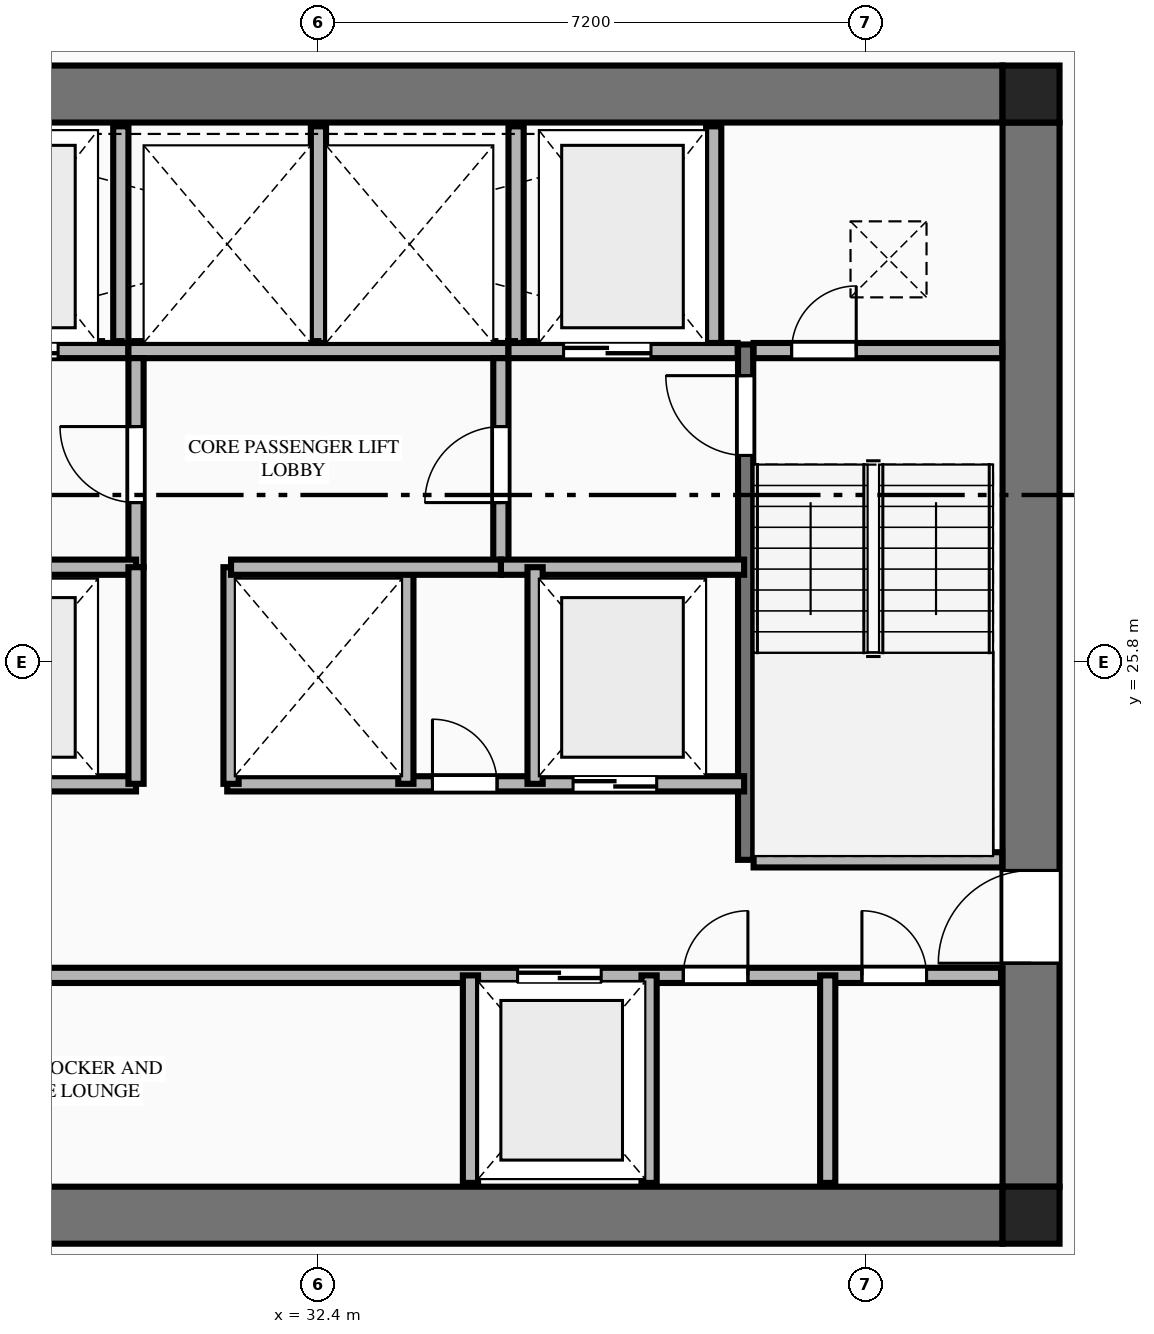
"""IFC4 building model, lengths in metres.
Left out: names, types, materials, properties, quantities, classifications, styles, units other than length and angle.
Written with IfcOpenShell. Run it as: python <this file> out.ifc"""

import sys

from ifc_helpers import new_model, si_unit, direction, frame, frame_2d, origin, origin_2d, place, context, subcontext, project, spatial, rectangle, extrude, element, fill, save


model = new_model("IFC4")
c1 = context("Model", 3, precision=1e-05, world=origin(), true_north=direction((0.0, 1.0)))
c2 = subcontext(c1, "Body", "Model", "MODEL_VIEW")
j1 = project(units=[si_unit("LENGTHUNIT", "METRE"), si_unit("PLANEANGLEUNIT", "RADIAN")], contexts=[c1])
p1 = place(None, origin())
s1 = spatial("IfcSite", under=j1, at=p1, CompositionType="ELEMENT")
p2 = place(p1, origin())
s2 = spatial("IfcBuilding", under=s1, at=p2, CompositionType="ELEMENT")
p3 = place(p2, frame((0.0, 0.0, 112.6)))
s3 = spatial("IfcBuildingStorey", under=s2, at=p3, CompositionType="ELEMENT", Elevation=112.6)
for number, where, z_axis, x_axis in (
    (1, (41.775, 18.525, 0.0), (0.0, 0.0, 1.0), (1.0, 0.0, 0.0)),
    (2, (41.775, 33.275, 0.0), (0.0, 0.0, 1.0), (1.0, 0.0, 0.0)),
):
    element("IfcColumn", number, at=place(p3, frame(where, z_axis=z_axis, x_axis=x_axis)), inside=s3, PredefinedType="COLUMN", context=c2, shape_type="SweptSolid", body=[
        extrude(rectangle(XDim=0.75, YDim=0.75, at=origin_2d()), origin(), (0.0, 0.0, 1.0), 3.55),
    ])
for number, where, z_axis, x_axis in (
    (3, (23.4, 18.525, 0.0), (0.0, 0.0, 1.0), (1.0, 0.0, 0.0)),
    (4, (23.4, 33.275, 0.0), (0.0, 0.0, 1.0), (1.0, 0.0, 0.0)),
):
    element("IfcWall", number, at=place(p3, frame(where, z_axis=z_axis, x_axis=x_axis)), inside=s3, PredefinedType="SHEAR", context=c2, shape_type="SweptSolid", body=[
        extrude(rectangle(XDim=18.0, YDim=0.75, at=frame_2d((9.0, 0.0))), origin(), (0.0, 0.0, 1.0), 3.34),
    ])
p4 = place(p3, frame((41.775, 18.9, 0.0), z_axis=(0.0, 0.0, 1.0), x_axis=(0.0, 1.0, 0.0)))
e5 = element("IfcWall", 5, at=p4, inside=s3, PredefinedType="SHEAR", context=c2, shape_type="SweptSolid", body=[
    extrude(rectangle(XDim=14.0, YDim=0.75, at=frame_2d((7.0, 0.0))), origin(), (0.0, 0.0, 1.0), 3.34),
])
p5 = place(p4, frame((2.94, 0.0, 0.0)))
e6 = element("IfcOpeningElement", 6, at=p5, cuts=e5, PredefinedType="OPENING", context=c2, shape_type="SweptSolid", body=[
    extrude(rectangle(XDim=1.22, YDim=2.25, at=frame_2d((0.61, 1.125))), frame((0.0, 0.385, 0.0), z_axis=(0.0, -1.0, 0.0), x_axis=(1.0, 0.0, 0.0)), (0.0, 0.0, 1.0), 0.77),
])
p6 = place(p3, frame((38.02, 23.2, 0.0), z_axis=(0.0, 0.0, 1.0), x_axis=(0.0, 1.0, 0.0)))
e7 = element("IfcWall", 7, at=p6, inside=s3, PredefinedType="SHEAR", context=c2, shape_type="SweptSolid", body=[
    extrude(rectangle(XDim=6.78, YDim=0.2, at=frame_2d((3.39, 0.0))), origin(), (0.0, 0.0, 1.0), 3.55),
])
p7 = place(p6, frame((5.32, 0.0, 0.0)))
e8 = element("IfcOpeningElement", 8, at=p7, cuts=e7, PredefinedType="OPENING", context=c2, shape_type="SweptSolid", body=[
    extrude(rectangle(XDim=1.05, YDim=2.15, at=frame_2d((0.525, 1.075))), frame((0.0, 0.11, 0.0), z_axis=(0.0, -1.0, 0.0), x_axis=(1.0, 0.0, 0.0)), (0.0, 0.0, 1.0), 0.22),
])
p8 = place(p3, frame((38.125, 23.2, 0.0), z_axis=(0.0, 0.0, 1.0), x_axis=(1.0, 0.0, 0.0)))
e9 = element("IfcWall", 9, at=p8, inside=s3, PredefinedType="PLUMBINGWALL", context=c2, shape_type="SweptSolid", body=[
    extrude(rectangle(XDim=3.27, YDim=0.2, at=frame_2d((1.635, 0.0))), origin(), (0.0, 0.0, 1.0), 3.34),
])
p9 = place(p3, frame((26.885, 29.9, 0.0), z_axis=(0.0, 0.0, 1.0), x_axis=(1.0, 0.0, 0.0)))
e10 = element("IfcWall", 10, at=p9, inside=s3, PredefinedType="PLUMBINGWALL", context=c2, shape_type="SweptSolid", body=[
    extrude(rectangle(XDim=3.015, YDim=0.2, at=frame_2d((1.507, 0.0))), origin(), (0.0, 0.0, 1.0), 3.34),
])
p10 = place(p9, frame((0.94, 0.0, 0.0)))
e11 = element("IfcOpeningElement", 11, at=p10, cuts=e10, PredefinedType="OPENING", context=c2, shape_type="SweptSolid", body=[
    extrude(rectangle(XDim=1.15, YDim=2.2, at=frame_2d((0.575, 1.1))), frame((0.0, 0.11, 0.0), z_axis=(0.0, -1.0, 0.0), x_axis=(1.0, 0.0, 0.0)), (0.0, 0.0, 1.0), 0.22),
])
p11 = place(p3, frame((29.9, 29.9, 0.0), z_axis=(0.0, 0.0, 1.0), x_axis=(1.0, 0.0, 0.0)))
e12 = element("IfcWall", 12, at=p11, inside=s3, PredefinedType="PLUMBINGWALL", context=c2, shape_type="SweptSolid", body=[
    extrude(rectangle(XDim=5.0, YDim=0.2, at=frame_2d((2.5, 0.0))), origin(), (0.0, 0.0, 1.0), 3.34),
])
p12 = place(p3, frame((34.9, 29.9, 0.0), z_axis=(0.0, 0.0, 1.0), x_axis=(1.0, 0.0, 0.0)))
e13 = element("IfcWall", 13, at=p12, inside=s3, PredefinedType="PLUMBINGWALL", context=c2, shape_type="SweptSolid", body=[
    extrude(rectangle(XDim=3.015, YDim=0.2, at=frame_2d((1.508, 0.0))), origin(), (0.0, 0.0, 1.0), 3.34),
])
p13 = place(p12, frame((0.725, 0.0, 0.0)))
e14 = element("IfcOpeningElement", 14, at=p13, cuts=e13, PredefinedType="OPENING", context=c2, shape_type="SweptSolid", body=[
    extrude(rectangle(XDim=1.15, YDim=2.2, at=frame_2d((0.575, 1.1))), frame((0.0, 0.11, 0.0), z_axis=(0.0, -1.0, 0.0), x_axis=(1.0, 0.0, 0.0)), (0.0, 0.0, 1.0), 0.22),
])
p14 = place(p3, frame((38.125, 29.9, 0.0), z_axis=(0.0, 0.0, 1.0), x_axis=(1.0, 0.0, 0.0)))
e15 = element("IfcWall", 15, at=p14, inside=s3, PredefinedType="PLUMBINGWALL", context=c2, shape_type="SweptSolid", body=[
    extrude(rectangle(XDim=3.27, YDim=0.2, at=frame_2d((1.635, 0.0))), origin(), (0.0, 0.0, 1.0), 3.34),
])
p15 = place(p14, frame((0.5, 0.0, 0.0)))
e16 = element("IfcOpeningElement", 16, at=p15, cuts=e15, PredefinedType="OPENING", context=c2, shape_type="SweptSolid", body=[
    extrude(rectangle(XDim=0.85, YDim=2.05, at=frame_2d((0.425, 1.025))), frame((0.0, 0.11, 0.0), z_axis=(0.0, -1.0, 0.0), x_axis=(1.0, 0.0, 0.0)), (0.0, 0.0, 1.0), 0.22),
])
for number, where, z_axis, x_axis in (
    (17, (29.8, 30.0, 0.0), (0.0, 0.0, 1.0), (0.0, 1.0, 0.0)),
    (18, (32.4, 30.0, 0.0), (0.0, 0.0, 1.0), (0.0, 1.0, 0.0)),
    (19, (35.0, 30.0, 0.0), (0.0, 0.0, 1.0), (0.0, 1.0, 0.0)),
    (20, (37.6, 30.0, 0.0), (0.0, 0.0, 1.0), (0.0, 1.0, 0.0)),
):
    element("IfcWall", number, at=place(p3, frame(where, z_axis=z_axis, x_axis=x_axis)), inside=s3, PredefinedType="PLUMBINGWALL", context=c2, shape_type="SweptSolid", body=[
        extrude(rectangle(XDim=2.85, YDim=0.2, at=frame_2d((1.425, 0.0))), origin(), (0.0, 0.0, 1.0), 3.34),
    ])
p16 = place(p3, frame((30.0, 27.05, 0.0), z_axis=(0.0, 0.0, 1.0), x_axis=(0.0, 1.0, 0.0)))
e21 = element("IfcWall", 21, at=p16, inside=s3, PredefinedType="PLUMBINGWALL", context=c2, shape_type="SweptSolid", body=[
    extrude(rectangle(XDim=2.75, YDim=0.2, at=frame_2d((1.375, 0.0))), origin(), (0.0, 0.0, 1.0), 3.34),
])
p17 = place(p16, frame((0.85, 0.0, 0.0)))
e22 = element("IfcOpeningElement", 22, at=p17, cuts=e21, PredefinedType="OPENING", context=c2, shape_type="SweptSolid", body=[
    extrude(rectangle(XDim=1.0, YDim=2.15, at=frame_2d((0.5, 1.075))), frame((0.0, 0.11, 0.0), z_axis=(0.0, -1.0, 0.0), x_axis=(1.0, 0.0, 0.0)), (0.0, 0.0, 1.0), 0.22),
])
p18 = place(p3, frame((26.8, 27.05, 0.0), z_axis=(0.0, 0.0, 1.0), x_axis=(1.0, 0.0, 0.0)))
e23 = element("IfcWall", 23, at=p18, inside=s3, PredefinedType="PLUMBINGWALL", context=c2, shape_type="SweptSolid", body=[
    extrude(rectangle(XDim=3.2, YDim=0.2, at=frame_2d((1.6, 0.0))), origin(), (0.0, 0.0, 1.0), 3.34),
])
p19 = place(p3, frame((34.8, 27.05, 0.0), z_axis=(0.0, 0.0, 1.0), x_axis=(0.0, 1.0, 0.0)))
e24 = element("IfcWall", 24, at=p19, inside=s3, PredefinedType="PLUMBINGWALL", context=c2, shape_type="SweptSolid", body=[
    extrude(rectangle(XDim=2.75, YDim=0.2, at=frame_2d((1.375, 0.0))), origin(), (0.0, 0.0, 1.0), 3.34),
])
p20 = place(p19, frame((0.85, 0.0, 0.0)))
e25 = element("IfcOpeningElement", 25, at=p20, cuts=e24, PredefinedType="OPENING", context=c2, shape_type="SweptSolid", body=[
    extrude(rectangle(XDim=1.0, YDim=2.15, at=frame_2d((0.5, 1.075))), frame((0.0, 0.11, 0.0), z_axis=(0.0, -1.0, 0.0), x_axis=(1.0, 0.0, 0.0)), (0.0, 0.0, 1.0), 0.22),
])
p21 = place(p3, frame((34.8, 27.05, 0.0), z_axis=(0.0, 0.0, 1.0), x_axis=(1.0, 0.0, 0.0)))
e26 = element("IfcWall", 26, at=p21, inside=s3, PredefinedType="PLUMBINGWALL", context=c2, shape_type="SweptSolid", body=[
    extrude(rectangle(XDim=3.2, YDim=0.2, at=frame_2d((1.6, 0.0))), origin(), (0.0, 0.0, 1.0), 3.34),
])
p22 = place(p3, frame((26.8, 24.2, 0.0), z_axis=(0.0, 0.0, 1.0), x_axis=(1.0, 0.0, 0.0)))
e27 = element("IfcWall", 27, at=p22, inside=s3, PredefinedType="PLUMBINGWALL", context=c2, shape_type="SweptSolid", body=[
    extrude(rectangle(XDim=3.2, YDim=0.2, at=frame_2d((1.6, 0.0))), origin(), (0.0, 0.0, 1.0), 3.34),
])
p23 = place(p22, frame((0.85, 0.0, 0.0)))
e28 = element("IfcOpeningElement", 28, at=p23, cuts=e27, PredefinedType="OPENING", context=c2, shape_type="SweptSolid", body=[
    extrude(rectangle(XDim=1.1, YDim=2.2, at=frame_2d((0.55, 1.1))), frame((0.0, 0.11, 0.0), z_axis=(0.0, -1.0, 0.0), x_axis=(1.0, 0.0, 0.0)), (0.0, 0.0, 1.0), 0.22),
])
p24 = place(p3, frame((30.0, 24.2, 0.0), z_axis=(0.0, 0.0, 1.0), x_axis=(0.0, 1.0, 0.0)))
e29 = element("IfcWall", 29, at=p24, inside=s3, PredefinedType="PLUMBINGWALL", context=c2, shape_type="SweptSolid", body=[
    extrude(rectangle(XDim=2.85, YDim=0.2, at=frame_2d((1.425, 0.0))), origin(), (0.0, 0.0, 1.0), 3.34),
])
p25 = place(p3, frame((31.2, 24.2, 0.0), z_axis=(0.0, 0.0, 1.0), x_axis=(1.0, 0.0, 0.0)))
e30 = element("IfcWall", 30, at=p25, inside=s3, PredefinedType="PLUMBINGWALL", context=c2, shape_type="SweptSolid", body=[
    extrude(rectangle(XDim=6.8, YDim=0.2, at=frame_2d((3.4, 0.0))), origin(), (0.0, 0.0, 1.0), 3.34),
])
p26 = place(p25, frame((2.7, 0.0, 0.0)))
e31 = element("IfcOpeningElement", 31, at=p26, cuts=e30, PredefinedType="OPENING", context=c2, shape_type="SweptSolid", body=[
    extrude(rectangle(XDim=0.85, YDim=2.05, at=frame_2d((0.425, 1.025))), frame((0.0, 0.11, 0.0), z_axis=(0.0, -1.0, 0.0), x_axis=(1.0, 0.0, 0.0)), (0.0, 0.0, 1.0), 0.22),
])
p27 = place(p25, frame((4.55, 0.0, 0.0)))
e32 = element("IfcOpeningElement", 32, at=p27, cuts=e30, PredefinedType="OPENING", context=c2, shape_type="SweptSolid", body=[
    extrude(rectangle(XDim=1.1, YDim=2.2, at=frame_2d((0.55, 1.1))), frame((0.0, 0.11, 0.0), z_axis=(0.0, -1.0, 0.0), x_axis=(1.0, 0.0, 0.0)), (0.0, 0.0, 1.0), 0.22),
])
for number, where, z_axis, x_axis in (
    (33, (31.25, 24.2, 0.0), (0.0, 0.0, 1.0), (0.0, 1.0, 0.0)),
    (34, (33.55, 24.2, 0.0), (0.0, 0.0, 1.0), (0.0, 1.0, 0.0)),
    (35, (35.25, 24.2, 0.0), (0.0, 0.0, 1.0), (0.0, 1.0, 0.0)),
):
    element("IfcWall", number, at=place(p3, frame(where, z_axis=z_axis, x_axis=x_axis)), inside=s3, PredefinedType="PLUMBINGWALL", context=c2, shape_type="SweptSolid", body=[
        extrude(rectangle(XDim=2.85, YDim=0.2, at=frame_2d((1.425, 0.0))), origin(), (0.0, 0.0, 1.0), 3.34),
    ])
p28 = place(p3, frame((31.25, 27.05, 0.0), z_axis=(0.0, 0.0, 1.0), x_axis=(1.0, 0.0, 0.0)))
e36 = element("IfcWall", 36, at=p28, inside=s3, PredefinedType="PLUMBINGWALL", context=c2, shape_type="SweptSolid", body=[
    extrude(rectangle(XDim=3.55, YDim=0.2, at=frame_2d((1.775, 0.0))), origin(), (0.0, 0.0, 1.0), 3.34),
])
p29 = place(p3, frame((23.42, 21.68, 0.0), z_axis=(0.0, 0.0, 1.0), x_axis=(1.0, 0.0, 0.0)))
e37 = element("IfcWall", 37, at=p29, inside=s3, PredefinedType="PLUMBINGWALL", context=c2, shape_type="SweptSolid", body=[
    extrude(rectangle(XDim=17.96, YDim=0.2, at=frame_2d((8.98, 0.0))), origin(), (0.0, 0.0, 1.0), 3.34),
])
p30 = place(p29, frame((11.6, 0.0, 0.0)))
e38 = element("IfcOpeningElement", 38, at=p30, cuts=e37, PredefinedType="OPENING", context=c2, shape_type="SweptSolid", body=[
    extrude(rectangle(XDim=1.1, YDim=2.2, at=frame_2d((0.55, 1.1))), frame((0.0, 0.11, 0.0), z_axis=(0.0, -1.0, 0.0), x_axis=(1.0, 0.0, 0.0)), (0.0, 0.0, 1.0), 0.22),
])
p31 = place(p29, frame((0.41, 0.0, 0.0)))
e39 = element("IfcOpeningElement", 39, at=p31, cuts=e37, PredefinedType="OPENING", context=c2, shape_type="SweptSolid", body=[
    extrude(rectangle(XDim=0.85, YDim=2.05, at=frame_2d((0.425, 1.025))), frame((0.0, 0.11, 0.0), z_axis=(0.0, -1.0, 0.0), x_axis=(1.0, 0.0, 0.0)), (0.0, 0.0, 1.0), 0.22),
])
p32 = place(p29, frame((13.78, 0.0, 0.0)))
e40 = element("IfcOpeningElement", 40, at=p32, cuts=e37, PredefinedType="OPENING", context=c2, shape_type="SweptSolid", body=[
    extrude(rectangle(XDim=0.85, YDim=2.05, at=frame_2d((0.425, 1.025))), frame((0.0, 0.11, 0.0), z_axis=(0.0, -1.0, 0.0), x_axis=(1.0, 0.0, 0.0)), (0.0, 0.0, 1.0), 0.22),
])
p33 = place(p29, frame((16.13, 0.0, 0.0)))
e41 = element("IfcOpeningElement", 41, at=p33, cuts=e37, PredefinedType="OPENING", context=c2, shape_type="SweptSolid", body=[
    extrude(rectangle(XDim=0.85, YDim=2.05, at=frame_2d((0.425, 1.025))), frame((0.0, 0.11, 0.0), z_axis=(0.0, -1.0, 0.0), x_axis=(1.0, 0.0, 0.0)), (0.0, 0.0, 1.0), 0.22),
])
for number, where, z_axis, x_axis in (
    (42, (34.4, 18.95, 0.0), (0.0, 0.0, 1.0), (0.0, 1.0, 0.0)),
    (43, (36.75, 18.95, 0.0), (0.0, 0.0, 1.0), (0.0, 1.0, 0.0)),
    (44, (39.1, 18.95, 0.0), (0.0, 0.0, 1.0), (0.0, 1.0, 0.0)),
):
    element("IfcWall", number, at=place(p3, frame(where, z_axis=z_axis, x_axis=x_axis)), inside=s3, PredefinedType="PLUMBINGWALL", context=c2, shape_type="SweptSolid", body=[
        extrude(rectangle(XDim=2.73, YDim=0.2, at=frame_2d((1.365, 0.0))), origin(), (0.0, 0.0, 1.0), 3.34),
    ])
p34 = place(p5, origin())
e45 = element("IfcDoor", 45, at=p34, inside=s3, OperationType="SINGLE_SWING_LEFT", PredefinedType="DOOR", context=c2, shape_type="SweptSolid", body=[
    extrude(rectangle(XDim=1.22, YDim=2.25, at=frame_2d((0.61, 1.125))), frame((0.0, 0.025, 0.0), z_axis=(0.0, -1.0, 0.0), x_axis=(1.0, 0.0, 0.0)), (0.0, 0.0, 1.0), 0.05),
])
fill(e6, e45)
p35 = place(p7, origin())
e46 = element("IfcDoor", 46, at=p35, inside=s3, OperationType="SINGLE_SWING_RIGHT", PredefinedType="DOOR", context=c2, shape_type="SweptSolid", body=[
    extrude(rectangle(XDim=1.05, YDim=2.15, at=frame_2d((0.525, 1.075))), frame((0.0, 0.025, 0.0), z_axis=(0.0, -1.0, 0.0), x_axis=(1.0, 0.0, 0.0)), (0.0, 0.0, 1.0), 0.05),
])
fill(e8, e46)
p36 = place(p15, origin())
e47 = element("IfcDoor", 47, at=p36, inside=s3, OperationType="SINGLE_SWING_RIGHT", PredefinedType="DOOR", context=c2, shape_type="SweptSolid", body=[
    extrude(rectangle(XDim=0.85, YDim=2.05, at=frame_2d((0.425, 1.025))), frame((0.0, 0.025, 0.0), z_axis=(0.0, -1.0, 0.0), x_axis=(1.0, 0.0, 0.0)), (0.0, 0.0, 1.0), 0.05),
])
fill(e16, e47)
p37 = place(p10, origin())
e48 = element("IfcDoor", 48, at=p37, inside=s3, OperationType="DOUBLE_DOOR_SLIDING", PredefinedType="DOOR", context=c2, shape_type="SweptSolid", body=[
    extrude(rectangle(XDim=1.15, YDim=2.2, at=frame_2d((0.575, 1.1))), frame((0.0, 0.025, 0.0), z_axis=(0.0, -1.0, 0.0), x_axis=(1.0, 0.0, 0.0)), (0.0, 0.0, 1.0), 0.05),
])
fill(e11, e48)
p38 = place(p13, origin())
e49 = element("IfcDoor", 49, at=p38, inside=s3, OperationType="DOUBLE_DOOR_SLIDING", PredefinedType="DOOR", context=c2, shape_type="SweptSolid", body=[
    extrude(rectangle(XDim=1.15, YDim=2.2, at=frame_2d((0.575, 1.1))), frame((0.0, 0.025, 0.0), z_axis=(0.0, -1.0, 0.0), x_axis=(1.0, 0.0, 0.0)), (0.0, 0.0, 1.0), 0.05),
])
fill(e14, e49)
p39 = place(p17, origin())
e50 = element("IfcDoor", 50, at=p39, inside=s3, OperationType="SINGLE_SWING_RIGHT", PredefinedType="DOOR", context=c2, shape_type="SweptSolid", body=[
    extrude(rectangle(XDim=1.0, YDim=2.15, at=frame_2d((0.5, 1.075))), frame((0.0, 0.025, 0.0), z_axis=(0.0, -1.0, 0.0), x_axis=(1.0, 0.0, 0.0)), (0.0, 0.0, 1.0), 0.05),
])
fill(e22, e50)
p40 = place(p20, origin())
e51 = element("IfcDoor", 51, at=p40, inside=s3, OperationType="SINGLE_SWING_LEFT", PredefinedType="DOOR", context=c2, shape_type="SweptSolid", body=[
    extrude(rectangle(XDim=1.0, YDim=2.15, at=frame_2d((0.5, 1.075))), frame((0.0, 0.025, 0.0), z_axis=(0.0, -1.0, 0.0), x_axis=(1.0, 0.0, 0.0)), (0.0, 0.0, 1.0), 0.05),
])
fill(e25, e51)
p41 = place(p26, origin())
e52 = element("IfcDoor", 52, at=p41, inside=s3, OperationType="SINGLE_SWING_LEFT", PredefinedType="DOOR", context=c2, shape_type="SweptSolid", body=[
    extrude(rectangle(XDim=0.85, YDim=2.05, at=frame_2d((0.425, 1.025))), frame((0.0, 0.025, 0.0), z_axis=(0.0, -1.0, 0.0), x_axis=(1.0, 0.0, 0.0)), (0.0, 0.0, 1.0), 0.05),
])
fill(e31, e52)
p42 = place(p27, origin())
e53 = element("IfcDoor", 53, at=p42, inside=s3, OperationType="DOUBLE_DOOR_SLIDING", PredefinedType="DOOR", context=c2, shape_type="SweptSolid", body=[
    extrude(rectangle(XDim=1.1, YDim=2.2, at=frame_2d((0.55, 1.1))), frame((0.0, 0.025, 0.0), z_axis=(0.0, -1.0, 0.0), x_axis=(1.0, 0.0, 0.0)), (0.0, 0.0, 1.0), 0.05),
])
fill(e32, e53)
p43 = place(p30, origin())
e54 = element("IfcDoor", 54, at=p43, inside=s3, OperationType="DOUBLE_DOOR_SLIDING", PredefinedType="DOOR", context=c2, shape_type="SweptSolid", body=[
    extrude(rectangle(XDim=1.1, YDim=2.2, at=frame_2d((0.55, 1.1))), frame((0.0, 0.025, 0.0), z_axis=(0.0, -1.0, 0.0), x_axis=(1.0, 0.0, 0.0)), (0.0, 0.0, 1.0), 0.05),
])
fill(e38, e54)
p44 = place(p32, origin())
e55 = element("IfcDoor", 55, at=p44, inside=s3, OperationType="SINGLE_SWING_RIGHT", PredefinedType="DOOR", context=c2, shape_type="SweptSolid", body=[
    extrude(rectangle(XDim=0.85, YDim=2.05, at=frame_2d((0.425, 1.025))), frame((0.0, 0.025, 0.0), z_axis=(0.0, -1.0, 0.0), x_axis=(1.0, 0.0, 0.0)), (0.0, 0.0, 1.0), 0.05),
])
fill(e40, e55)
p45 = place(p33, origin())
e56 = element("IfcDoor", 56, at=p45, inside=s3, OperationType="SINGLE_SWING_LEFT", PredefinedType="DOOR", context=c2, shape_type="SweptSolid", body=[
    extrude(rectangle(XDim=0.85, YDim=2.05, at=frame_2d((0.425, 1.025))), frame((0.0, 0.025, 0.0), z_axis=(0.0, -1.0, 0.0), x_axis=(1.0, 0.0, 0.0)), (0.0, 0.0, 1.0), 0.05),
])
fill(e41, e56)
save(model, sys.argv[1])
